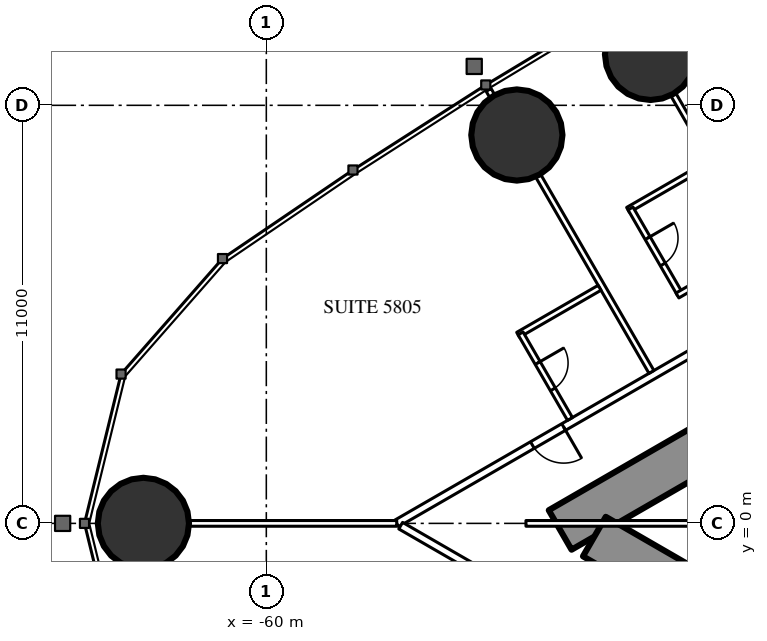
"""IFC4 building model, lengths in metres.
Left out: names, types, materials, properties, quantities, classifications, styles, units other than length and angle.
Written with IfcOpenShell. Run it as: python <this file> out.ifc"""

import sys

from ifc_helpers import new_model, si_unit, direction, frame, frame_2d, origin, origin_2d, place, context, subcontext, project, spatial, rectangle, circle, extrude, element, fill, save


model = new_model("IFC4")
c1 = context("Model", 3, precision=1e-05, world=origin(), true_north=direction((0.0, 1.0)))
c2 = subcontext(c1, "Body", "Model", "MODEL_VIEW")
j1 = project(units=[si_unit("LENGTHUNIT", "METRE"), si_unit("PLANEANGLEUNIT", "RADIAN")], contexts=[c1])
p1 = place(None, origin())
s1 = spatial("IfcSite", under=j1, at=p1, CompositionType="ELEMENT")
p2 = place(p1, origin())
s2 = spatial("IfcBuilding", under=s1, at=p2, CompositionType="ELEMENT")
p3 = place(p2, frame((0.0, 0.0, 218.9)))
s3 = spatial("IfcBuildingStorey", under=s2, at=p3, CompositionType="ELEMENT", Elevation=218.9)
for number, where, z_axis, x_axis in (
    (1, (-63.234, 0.0, 0.0), (0.0, 0.0, 1.0), (1.0, 0.0, 0.0)),
    (2, (-49.89, 12.34, 0.0), (0.0, 0.0, 1.0), (1.0, 0.0, 0.0)),
    (3, (-53.408, 10.219, 0.0), (0.0, 0.0, 1.0), (1.0, 0.0, 0.0)),
):
    element("IfcColumn", number, at=place(p3, frame(where, z_axis=z_axis, x_axis=x_axis)), inside=s3, PredefinedType="COLUMN", context=c2, shape_type="SweptSolid", body=[
        extrude(circle(Radius=1.2, at=origin_2d()), origin(), (0.0, 0.0, 1.0), 3.6),
    ])
p4 = place(p3, frame((-27.2, 14.3, 0.0), z_axis=(0.0, 0.0, 1.0), x_axis=(-0.866026593062, -0.499997940104, 0.0)))
e4 = element("IfcWall", 4, at=p4, inside=s3, PredefinedType="SHEAR", context=c2, shape_type="SweptSolid", body=[
    extrude(rectangle(XDim=28.946, YDim=1.2, at=frame_2d((14.473, 0.0))), origin(), (0.0, 0.0, 1.0), 3.6),
])
p5 = place(p4, frame((4.6, 0.0, 0.0)))
e5 = element("IfcOpeningElement", 5, at=p5, cuts=e4, PredefinedType="OPENING", context=c2, shape_type="SweptSolid", body=[
    extrude(rectangle(XDim=1.0, YDim=2.2, at=frame_2d((0.5, 1.1))), frame((0.0, 0.61, 0.0), z_axis=(0.0, -1.0, 0.0), x_axis=(1.0, 0.0, 0.0)), (0.0, 0.0, 1.0), 1.22),
])
p6 = place(p4, frame((13.395, 0.0, 0.0)))
e6 = element("IfcOpeningElement", 6, at=p6, cuts=e4, PredefinedType="OPENING", context=c2, shape_type="SweptSolid", body=[
    extrude(rectangle(XDim=1.8, YDim=2.2, at=frame_2d((0.9, 1.1))), frame((0.0, 0.61, 0.0), z_axis=(0.0, -1.0, 0.0), x_axis=(1.0, 0.0, 0.0)), (0.0, 0.0, 1.0), 1.22),
])
p7 = place(p3, frame((-27.2, -14.3, 0.0), z_axis=(0.0, 0.0, 1.0), x_axis=(-0.866024021859, 0.500002393557, 0.0)))
e7 = element("IfcWall", 7, at=p7, inside=s3, PredefinedType="SHEAR", context=c2, shape_type="SweptSolid", body=[
    extrude(rectangle(XDim=27.907, YDim=1.2, at=frame_2d((13.954, 0.0))), origin(), (0.0, 0.0, 1.0), 3.6),
])
p8 = place(p7, frame((4.6, 0.0, 0.0)))
e8 = element("IfcOpeningElement", 8, at=p8, cuts=e7, PredefinedType="OPENING", context=c2, shape_type="SweptSolid", body=[
    extrude(rectangle(XDim=1.0, YDim=2.2, at=frame_2d((0.5, 1.1))), frame((0.0, 0.61, 0.0), z_axis=(0.0, -1.0, 0.0), x_axis=(1.0, 0.0, 0.0)), (0.0, 0.0, 1.0), 1.22),
])
p9 = place(p7, frame((13.395, 0.0, 0.0)))
e9 = element("IfcOpeningElement", 9, at=p9, cuts=e7, PredefinedType="OPENING", context=c2, shape_type="SweptSolid", body=[
    extrude(rectangle(XDim=1.8, YDim=2.2, at=frame_2d((0.9, 1.1))), frame((0.0, 0.61, 0.0), z_axis=(0.0, -1.0, 0.0), x_axis=(1.0, 0.0, 0.0)), (0.0, 0.0, 1.0), 1.22),
])
p10 = place(p3, frame((-28.737, 16.068, 0.0), z_axis=(0.0, 0.0, 1.0), x_axis=(-0.866026057212, -0.499998868229, 0.0)))
e10 = element("IfcWall", 10, at=p10, inside=s3, PredefinedType="PARTITIONING", context=c2, shape_type="SweptSolid", body=[
    extrude(rectangle(XDim=32.137, YDim=0.2, at=frame_2d((16.068, 0.0))), origin(), (0.0, 0.0, 1.0), 3.35),
])
p11 = place(p10, frame((1.08, 0.0, 0.0)))
e11 = element("IfcOpeningElement", 11, at=p11, cuts=e10, PredefinedType="OPENING", context=c2, shape_type="SweptSolid", body=[
    extrude(rectangle(XDim=1.8, YDim=2.03, at=frame_2d((0.9, 1.015))), frame((0.0, 0.11, 0.0), z_axis=(0.0, -1.0, 0.0), x_axis=(1.0, 0.0, 0.0)), (0.0, 0.0, 1.0), 0.22),
])
p12 = place(p10, frame((6.86, 0.0, 0.0)))
e12 = element("IfcOpeningElement", 12, at=p12, cuts=e10, PredefinedType="OPENING", context=c2, shape_type="SweptSolid", body=[
    extrude(rectangle(XDim=1.0, YDim=2.2, at=frame_2d((0.5, 1.1))), frame((0.0, 0.11, 0.0), z_axis=(0.0, -1.0, 0.0), x_axis=(1.0, 0.0, 0.0)), (0.0, 0.0, 1.0), 0.22),
])
p13 = place(p10, frame((16.418, 0.0, 0.0)))
e13 = element("IfcOpeningElement", 13, at=p13, cuts=e10, PredefinedType="OPENING", context=c2, shape_type="SweptSolid", body=[
    extrude(rectangle(XDim=0.95, YDim=2.2, at=frame_2d((0.475, 1.1))), frame((0.0, 0.11, 0.0), z_axis=(0.0, -1.0, 0.0), x_axis=(1.0, 0.0, 0.0)), (0.0, 0.0, 1.0), 0.22),
])
p14 = place(p10, frame((20.567, 0.0, 0.0)))
e14 = element("IfcOpeningElement", 14, at=p14, cuts=e10, PredefinedType="OPENING", context=c2, shape_type="SweptSolid", body=[
    extrude(rectangle(XDim=0.95, YDim=2.2, at=frame_2d((0.475, 1.1))), frame((0.0, 0.11, 0.0), z_axis=(0.0, -1.0, 0.0), x_axis=(1.0, 0.0, 0.0)), (0.0, 0.0, 1.0), 0.22),
])
p15 = place(p10, frame((27.065, 0.0, 0.0)))
e15 = element("IfcOpeningElement", 15, at=p15, cuts=e10, PredefinedType="OPENING", context=c2, shape_type="SweptSolid", body=[
    extrude(rectangle(XDim=0.95, YDim=2.2, at=frame_2d((0.475, 1.1))), frame((0.0, 0.11, 0.0), z_axis=(0.0, -1.0, 0.0), x_axis=(1.0, 0.0, 0.0)), (0.0, 0.0, 1.0), 0.22),
])
p16 = place(p3, frame((-46.274, 6.059, 0.0), z_axis=(0.0, 0.0, 1.0), x_axis=(-0.500020471368, 0.866013584312, 0.0)))
e16 = element("IfcWall", 16, at=p16, inside=s3, PredefinedType="PARTITIONING", context=c2, shape_type="SweptSolid", body=[
    extrude(rectangle(XDim=6.028, YDim=0.15, at=frame_2d((3.014, 0.0))), origin(), (0.0, 0.0, 1.0), 2.45),
])
p17 = place(p3, frame((-49.866, 3.985, 0.0), z_axis=(0.0, 0.0, 1.0), x_axis=(-0.500000694566, 0.866025002776, 0.0)))
e17 = element("IfcWall", 17, at=p17, inside=s3, PredefinedType="PARTITIONING", context=c2, shape_type="SweptSolid", body=[
    extrude(rectangle(XDim=5.95, YDim=0.15, at=frame_2d((2.975, 0.0))), origin(), (0.0, 0.0, 1.0), 2.45),
])
p18 = place(p3, frame((-54.061, 11.25, 0.0), z_axis=(0.0, 0.0, 1.0), x_axis=(-0.500391173478, 0.865799441849, 0.0)))
e18 = element("IfcWall", 18, at=p18, inside=s3, PredefinedType="PARTITIONING", context=c2, shape_type="SweptSolid", body=[
    extrude(rectangle(XDim=0.179, YDim=0.15, at=frame_2d((0.089, 0.0))), origin(), (0.0, 0.0, 1.0), 2.45),
])
p19 = place(p3, frame((-56.568, 0.0, 0.0), z_axis=(0.0, 0.0, 1.0), x_axis=(-1.0, 0.0, 0.0)))
e19 = element("IfcWall", 19, at=p19, inside=s3, PredefinedType="PARTITIONING", context=c2, shape_type="SweptSolid", body=[
    extrude(rectangle(XDim=5.446, YDim=0.15, at=frame_2d((2.723, 0.0))), origin(), (0.0, 0.0, 1.0), 2.45),
])
p20 = place(p3, frame((-44.715, -6.844, 0.0), z_axis=(0.0, 0.0, 1.0), x_axis=(-0.866025261224, 0.500000246922, 0.0)))
e20 = element("IfcWall", 20, at=p20, inside=s3, PredefinedType="PARTITIONING", context=c2, shape_type="SweptSolid", body=[
    extrude(rectangle(XDim=13.567, YDim=0.2, at=frame_2d((6.783, 0.0))), origin(), (0.0, 0.0, 1.0), 3.35),
])
p21 = place(p20, frame((9.667, 0.0, 0.0)))
e21 = element("IfcOpeningElement", 21, at=p21, cuts=e20, PredefinedType="OPENING", context=c2, shape_type="SweptSolid", body=[
    extrude(rectangle(XDim=0.95, YDim=2.2, at=frame_2d((0.475, 1.1))), frame((0.0, 0.11, 0.0), z_axis=(0.0, -1.0, 0.0), x_axis=(1.0, 0.0, 0.0)), (0.0, 0.0, 1.0), 0.22),
])
p22 = place(p20, frame((2.117, 0.0, 0.0)))
e22 = element("IfcOpeningElement", 22, at=p22, cuts=e20, PredefinedType="OPENING", context=c2, shape_type="SweptSolid", body=[
    extrude(rectangle(XDim=0.95, YDim=2.2, at=frame_2d((0.475, 1.1))), frame((0.0, 0.11, 0.0), z_axis=(0.0, -1.0, 0.0), x_axis=(1.0, 0.0, 0.0)), (0.0, 0.0, 1.0), 0.22),
])
p23 = place(p20, frame((0.5, 0.0, 0.0)))
e23 = element("IfcOpeningElement", 23, at=p23, cuts=e20, PredefinedType="OPENING", context=c2, shape_type="SweptSolid", body=[
    extrude(rectangle(XDim=0.967, YDim=2.2, at=frame_2d((0.483, 1.1))), frame((0.0, 0.11, 0.0), z_axis=(0.0, -1.0, 0.0), x_axis=(1.0, 0.0, 0.0)), (0.0, 0.0, 1.0), 0.22),
])
p24 = place(p3, frame((-48.339, 9.486, 0.0), z_axis=(0.0, 0.0, 1.0), x_axis=(-0.866006523861, -0.500032699561, 0.0)))
e24 = element("IfcWall", 24, at=p24, inside=s3, PredefinedType="PARTITIONING", context=c2, shape_type="SweptSolid", body=[
    extrude(rectangle(XDim=2.475, YDim=0.15, at=frame_2d((1.237, 0.0))), origin(), (0.0, 0.0, 1.0), 3.35),
])
p25 = place(p3, frame((-49.117, 6.034, 0.0), z_axis=(0.0, 0.0, 1.0), x_axis=(-0.500006934395, 0.866021400173, 0.0)))
e25 = element("IfcWall", 25, at=p25, inside=s3, PredefinedType="PARTITIONING", context=c2, shape_type="SweptSolid", body=[
    extrude(rectangle(XDim=2.6, YDim=0.15, at=frame_2d((1.3, 0.0))), origin(), (0.0, 0.0, 1.0), 3.35),
])
p26 = place(p25, frame((0.9, 0.0, 0.0)))
e26 = element("IfcOpeningElement", 26, at=p26, cuts=e25, PredefinedType="OPENING", context=c2, shape_type="SweptSolid", body=[
    extrude(rectangle(XDim=0.8, YDim=2.2, at=frame_2d((0.4, 1.1))), frame((0.0, 0.085, 0.0), z_axis=(0.0, -1.0, 0.0), x_axis=(1.0, 0.0, 0.0)), (0.0, 0.0, 1.0), 0.17),
])
for number, where, z_axis, x_axis in (
    (27, (-47.039, 7.234, 0.0), (0.0, 0.0, 1.0), (-0.866, -0.5, 0.0)),
    (28, (-51.231, 6.199, 0.0), (0.0, 0.0, 1.0), (-0.866, -0.5, 0.0)),
):
    element("IfcWall", number, at=place(p3, frame(where, z_axis=z_axis, x_axis=x_axis)), inside=s3, PredefinedType="PARTITIONING", context=c2, shape_type="SweptSolid", body=[
        extrude(rectangle(XDim=2.475, YDim=0.15, at=frame_2d((1.238, 0.0))), origin(), (0.0, 0.0, 1.0), 3.35),
    ])
p27 = place(p3, frame((-52.01, 2.747, 0.0), z_axis=(0.0, 0.0, 1.0), x_axis=(-0.500006934395, 0.866021400173, 0.0)))
e29 = element("IfcWall", 29, at=p27, inside=s3, PredefinedType="PARTITIONING", context=c2, shape_type="SweptSolid", body=[
    extrude(rectangle(XDim=2.6, YDim=0.15, at=frame_2d((1.3, 0.0))), origin(), (0.0, 0.0, 1.0), 3.35),
])
p28 = place(p27, frame((0.9, 0.0, 0.0)))
e30 = element("IfcOpeningElement", 30, at=p28, cuts=e29, PredefinedType="OPENING", context=c2, shape_type="SweptSolid", body=[
    extrude(rectangle(XDim=0.8, YDim=2.2, at=frame_2d((0.4, 1.1))), frame((0.0, 0.085, 0.0), z_axis=(0.0, -1.0, 0.0), x_axis=(1.0, 0.0, 0.0)), (0.0, 0.0, 1.0), 0.17),
])
p29 = place(p3, frame((-44.575, 0.0, 0.0), z_axis=(0.0, 0.0, 1.0), x_axis=(-1.0, 0.0, 0.0)))
e31 = element("IfcWall", 31, at=p29, inside=s3, PredefinedType="PARTITIONING", context=c2, shape_type="SweptSolid", body=[
    extrude(rectangle(XDim=8.593, YDim=0.15, at=frame_2d((4.297, 0.0))), origin(), (0.0, 0.0, 1.0), 2.45),
])
p30 = place(p26, origin())
e32 = element("IfcDoor", 32, at=p30, inside=s3, OperationType="SINGLE_SWING_RIGHT", PredefinedType="DOOR", context=c2, shape_type="SweptSolid", body=[
    extrude(rectangle(XDim=0.8, YDim=2.2, at=frame_2d((0.4, 1.1))), frame((0.0, 0.025, 0.0), z_axis=(0.0, -1.0, 0.0), x_axis=(1.0, 0.0, 0.0)), (0.0, 0.0, 1.0), 0.05),
])
fill(e26, e32)
p31 = place(p28, origin())
e33 = element("IfcDoor", 33, at=p31, inside=s3, OperationType="SINGLE_SWING_RIGHT", PredefinedType="DOOR", context=c2, shape_type="SweptSolid", body=[
    extrude(rectangle(XDim=0.8, YDim=2.2, at=frame_2d((0.4, 1.1))), frame((0.0, 0.025, 0.0), z_axis=(0.0, -1.0, 0.0), x_axis=(1.0, 0.0, 0.0)), (0.0, 0.0, 1.0), 0.05),
])
fill(e30, e33)
p32 = place(p15, origin())
e34 = element("IfcDoor", 34, at=p32, inside=s3, OperationType="SINGLE_SWING_LEFT", PredefinedType="DOOR", context=c2, shape_type="SweptSolid", body=[
    extrude(rectangle(XDim=0.95, YDim=2.2, at=frame_2d((0.475, 1.1))), frame((0.0, 0.025, 0.0), z_axis=(0.0, -1.0, 0.0), x_axis=(1.0, 0.0, 0.0)), (0.0, 0.0, 1.0), 0.05),
])
fill(e15, e34)
save(model, sys.argv[1])
